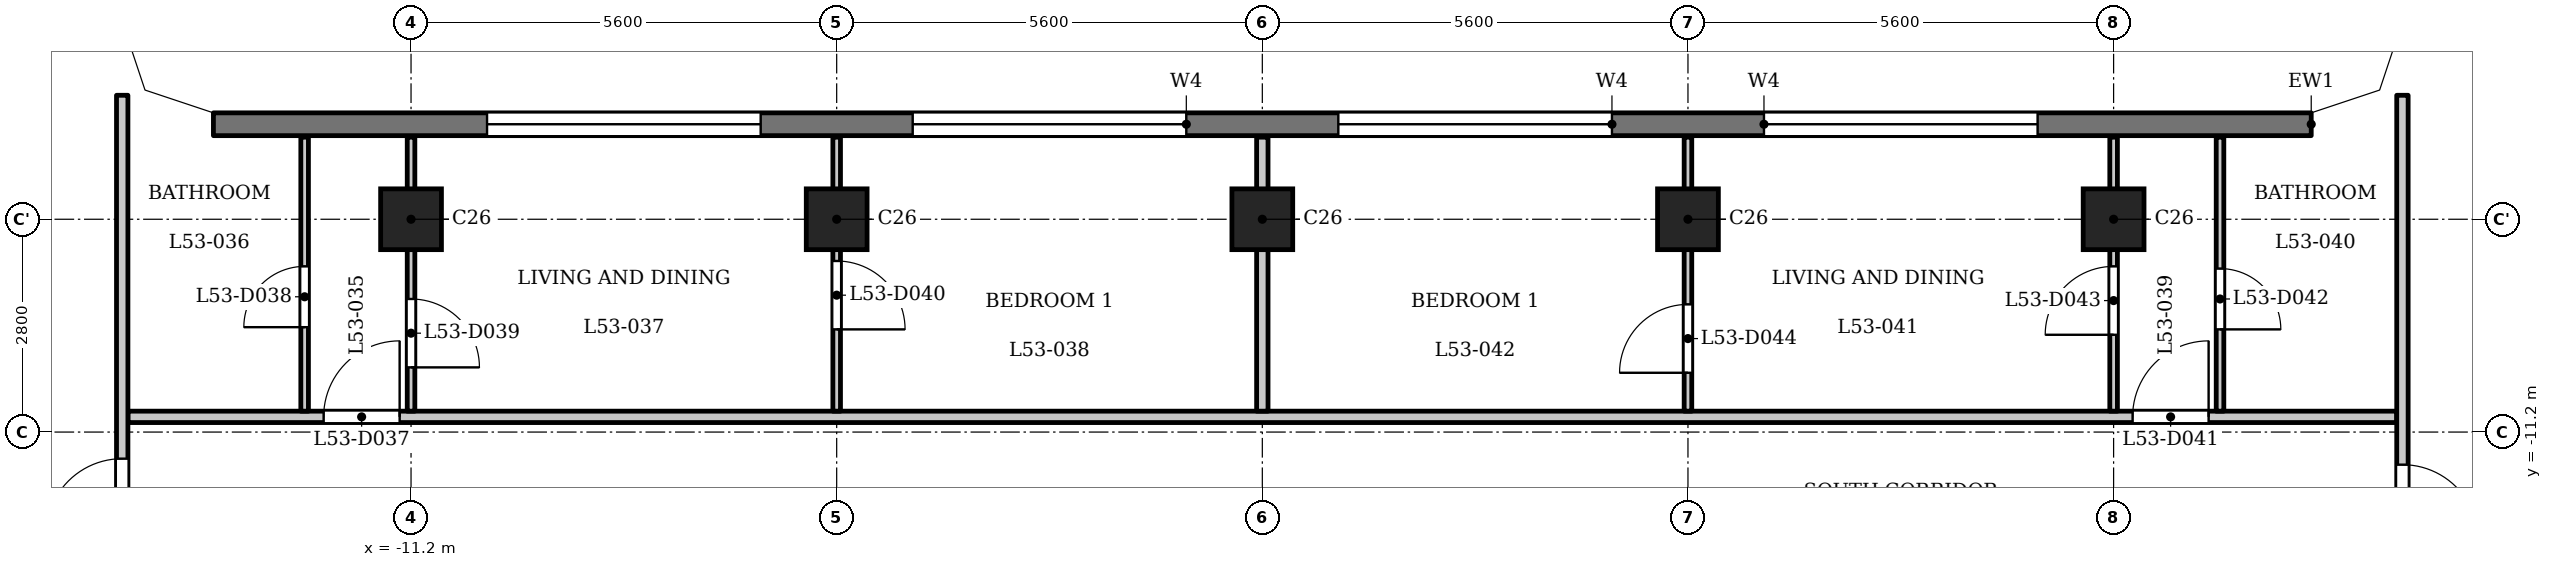
"""IFC4 building model, lengths in metres.
Left out: names, types, materials, properties, quantities, classifications, styles, units other than length and angle.
Written with IfcOpenShell. Run it as: python <this file> out.ifc"""

import sys

from ifc_helpers import new_model, si_unit, direction, frame, frame_2d, origin, origin_2d, place, context, subcontext, project, spatial, polyline, rectangle, outline, extrude, element, fill, save


model = new_model("IFC4")
c1 = context("Model", 3, precision=1e-05, world=origin(), true_north=direction((0.0, 1.0)))
c2 = subcontext(c1, "Body", "Model", "MODEL_VIEW")
j1 = project(units=[si_unit("LENGTHUNIT", "METRE"), si_unit("PLANEANGLEUNIT", "RADIAN")], contexts=[c1])
p1 = place(None, origin())
s1 = spatial("IfcSite", under=j1, at=p1, CompositionType="ELEMENT")
p2 = place(p1, origin())
s2 = spatial("IfcBuilding", under=s1, at=p2, CompositionType="ELEMENT")
p3 = place(p2, frame((0.0, 0.0, 206.4)))
s3 = spatial("IfcBuildingStorey", under=s2, at=p3, CompositionType="ELEMENT", Elevation=206.4)
for number, where, z_axis, x_axis in (
    (1, (-11.2, -8.4, 0.0), (0.0, 0.0, 1.0), (1.0, 0.0, 0.0)),
    (2, (-5.6, -8.4, 0.0), (0.0, 0.0, 1.0), (1.0, 0.0, 0.0)),
    (3, (0.0, -8.4, 0.0), (0.0, 0.0, 1.0), (1.0, 0.0, 0.0)),
    (4, (5.6, -8.4, 0.0), (0.0, 0.0, 1.0), (1.0, 0.0, 0.0)),
    (5, (11.2, -8.4, 0.0), (0.0, 0.0, 1.0), (1.0, 0.0, 0.0)),
):
    element("IfcColumn", number, at=place(p3, frame(where, z_axis=z_axis, x_axis=x_axis)), inside=s3, PredefinedType="COLUMN", context=c2, shape_type="SweptSolid", body=[
        extrude(rectangle(XDim=0.8, YDim=0.8, at=origin_2d()), origin(), (0.0, 0.0, 1.0), 3.5),
    ])
p4 = place(p3, frame((13.8, -7.15, 0.0), z_axis=(0.0, 0.0, 1.0), x_axis=(-1.0, 0.0, 0.0)))
e6 = element("IfcWall", 6, at=p4, inside=s3, PredefinedType="SOLIDWALL", context=c2, shape_type="SweptSolid", body=[
    extrude(rectangle(XDim=27.6, YDim=0.3, at=frame_2d((13.8, 0.0))), origin(), (0.0, 0.0, 1.0), 3.2),
])
p5 = place(p4, frame((3.6, 0.0, 1.2)))
e7 = element("IfcOpeningElement", 7, at=p5, cuts=e6, PredefinedType="OPENING", context=c2, shape_type="SweptSolid", body=[
    extrude(rectangle(XDim=3.6, YDim=0.95, at=frame_2d((1.8, 0.475))), frame((0.0, 0.16, 0.0), z_axis=(0.0, -1.0, 0.0), x_axis=(1.0, 0.0, 0.0)), (0.0, 0.0, 1.0), 0.32),
])
p6 = place(p4, frame((9.2, 0.0, 1.2)))
e8 = element("IfcOpeningElement", 8, at=p6, cuts=e6, PredefinedType="OPENING", context=c2, shape_type="SweptSolid", body=[
    extrude(rectangle(XDim=3.6, YDim=0.95, at=frame_2d((1.8, 0.475))), frame((0.0, 0.16, 0.0), z_axis=(0.0, -1.0, 0.0), x_axis=(1.0, 0.0, 0.0)), (0.0, 0.0, 1.0), 0.32),
])
p7 = place(p4, frame((14.8, 0.0, 1.2)))
e9 = element("IfcOpeningElement", 9, at=p7, cuts=e6, PredefinedType="OPENING", context=c2, shape_type="SweptSolid", body=[
    extrude(rectangle(XDim=3.6, YDim=0.95, at=frame_2d((1.8, 0.475))), frame((0.0, 0.16, 0.0), z_axis=(0.0, -1.0, 0.0), x_axis=(1.0, 0.0, 0.0)), (0.0, 0.0, 1.0), 0.32),
])
p8 = place(p4, frame((20.4, 0.0, 1.2)))
e10 = element("IfcOpeningElement", 10, at=p8, cuts=e6, PredefinedType="OPENING", context=c2, shape_type="SweptSolid", body=[
    extrude(rectangle(XDim=3.6, YDim=0.95, at=frame_2d((1.8, 0.475))), frame((0.0, 0.16, 0.0), z_axis=(0.0, -1.0, 0.0), x_axis=(1.0, 0.0, 0.0)), (0.0, 0.0, 1.0), 0.32),
])
p9 = place(p3, frame((-14.925, -11.0, 0.0), z_axis=(0.0, 0.0, 1.0), x_axis=(1.0, 0.0, 0.0)))
e11 = element("IfcWall", 11, at=p9, inside=s3, PredefinedType="PARTITIONING", context=c2, shape_type="SweptSolid", body=[
    extrude(rectangle(XDim=29.85, YDim=0.15, at=frame_2d((14.925, 0.0))), origin(), (0.0, 0.0, 1.0), 3.2),
])
p10 = place(p9, frame((2.575, 0.0, 0.0)))
e12 = element("IfcOpeningElement", 12, at=p10, cuts=e11, PredefinedType="OPENING", context=c2, shape_type="SweptSolid", body=[
    extrude(rectangle(XDim=1.0, YDim=2.1, at=frame_2d((0.5, 1.05))), frame((0.0, 0.085, 0.0), z_axis=(0.0, -1.0, 0.0), x_axis=(1.0, 0.0, 0.0)), (0.0, 0.0, 1.0), 0.17),
])
p11 = place(p9, frame((26.375, 0.0, 0.0)))
e13 = element("IfcOpeningElement", 13, at=p11, cuts=e11, PredefinedType="OPENING", context=c2, shape_type="SweptSolid", body=[
    extrude(rectangle(XDim=1.0, YDim=2.1, at=frame_2d((0.5, 1.05))), frame((0.0, 0.085, 0.0), z_axis=(0.0, -1.0, 0.0), x_axis=(1.0, 0.0, 0.0)), (0.0, 0.0, 1.0), 0.17),
])
p12 = place(p3, frame((-15.0, -13.125, 0.0), z_axis=(0.0, 0.0, 1.0), x_axis=(0.0, 1.0, 0.0)))
e14 = element("IfcWall", 14, at=p12, inside=s3, PredefinedType="PARTITIONING", context=c2, shape_type="SweptSolid", body=[
    extrude(rectangle(XDim=6.356, YDim=0.15, at=frame_2d((3.178, 0.0))), origin(), (0.0, 0.0, 1.0), 3.2),
])
p13 = place(p12, frame((0.575, 0.0, 0.0)))
e15 = element("IfcOpeningElement", 15, at=p13, cuts=e14, PredefinedType="OPENING", context=c2, shape_type="SweptSolid", body=[
    extrude(rectangle(XDim=1.0, YDim=2.1, at=frame_2d((0.5, 1.05))), frame((0.0, 0.085, 0.0), z_axis=(0.0, -1.0, 0.0), x_axis=(1.0, 0.0, 0.0)), (0.0, 0.0, 1.0), 0.17),
])
p14 = place(p3, frame((-12.6, -10.925, 0.0), z_axis=(0.0, 0.0, 1.0), x_axis=(0.0, 1.0, 0.0)))
e16 = element("IfcWall", 16, at=p14, inside=s3, PredefinedType="PARTITIONING", context=c2, shape_type="SweptSolid", body=[
    extrude(rectangle(XDim=3.605, YDim=0.1, at=frame_2d((1.802, 0.0))), origin(), (0.0, 0.0, 1.0), 3.2),
])
p15 = place(p14, frame((1.105, 0.0, 0.0)))
e17 = element("IfcOpeningElement", 17, at=p15, cuts=e16, PredefinedType="OPENING", context=c2, shape_type="SweptSolid", body=[
    extrude(rectangle(XDim=0.8, YDim=2.1, at=frame_2d((0.4, 1.05))), frame((0.0, 0.06, 0.0), z_axis=(0.0, -1.0, 0.0), x_axis=(1.0, 0.0, 0.0)), (0.0, 0.0, 1.0), 0.12),
])
p16 = place(p3, frame((-11.2, -10.925, 0.0), z_axis=(0.0, 0.0, 1.0), x_axis=(0.0, 1.0, 0.0)))
e18 = element("IfcWall", 18, at=p16, inside=s3, PredefinedType="PARTITIONING", context=c2, shape_type="SweptSolid", body=[
    extrude(rectangle(XDim=3.605, YDim=0.1, at=frame_2d((1.802, 0.0))), origin(), (0.0, 0.0, 1.0), 3.2),
])
p17 = place(p16, frame((0.576, 0.0, 0.0)))
e19 = element("IfcOpeningElement", 19, at=p17, cuts=e18, PredefinedType="OPENING", context=c2, shape_type="SweptSolid", body=[
    extrude(rectangle(XDim=0.9, YDim=2.1, at=frame_2d((0.45, 1.05))), frame((0.0, 0.06, 0.0), z_axis=(0.0, -1.0, 0.0), x_axis=(1.0, 0.0, 0.0)), (0.0, 0.0, 1.0), 0.12),
])
p18 = place(p3, frame((-5.6, -10.925, 0.0), z_axis=(0.0, 0.0, 1.0), x_axis=(0.0, 1.0, 0.0)))
e20 = element("IfcWall", 20, at=p18, inside=s3, PredefinedType="PARTITIONING", context=c2, shape_type="SweptSolid", body=[
    extrude(rectangle(XDim=3.605, YDim=0.1, at=frame_2d((1.802, 0.0))), origin(), (0.0, 0.0, 1.0), 3.2),
])
p19 = place(p18, frame((1.076, 0.0, 0.0)))
e21 = element("IfcOpeningElement", 21, at=p19, cuts=e20, PredefinedType="OPENING", context=c2, shape_type="SweptSolid", body=[
    extrude(rectangle(XDim=0.9, YDim=2.1, at=frame_2d((0.45, 1.05))), frame((0.0, 0.06, 0.0), z_axis=(0.0, -1.0, 0.0), x_axis=(1.0, 0.0, 0.0)), (0.0, 0.0, 1.0), 0.12),
])
p20 = place(p3, frame((0.0, -10.925, 0.0), z_axis=(0.0, 0.0, 1.0), x_axis=(0.0, 1.0, 0.0)))
e22 = element("IfcWall", 22, at=p20, inside=s3, PredefinedType="PARTITIONING", context=c2, shape_type="SweptSolid", body=[
    extrude(rectangle(XDim=3.605, YDim=0.15, at=frame_2d((1.802, 0.0))), origin(), (0.0, 0.0, 1.0), 3.2),
])
p21 = place(p3, frame((5.6, -10.925, 0.0), z_axis=(0.0, 0.0, 1.0), x_axis=(0.0, 1.0, 0.0)))
e23 = element("IfcWall", 23, at=p21, inside=s3, PredefinedType="PARTITIONING", context=c2, shape_type="SweptSolid", body=[
    extrude(rectangle(XDim=3.605, YDim=0.1, at=frame_2d((1.802, 0.0))), origin(), (0.0, 0.0, 1.0), 3.2),
])
p22 = place(p21, frame((0.505, 0.0, 0.0)))
e24 = element("IfcOpeningElement", 24, at=p22, cuts=e23, PredefinedType="OPENING", context=c2, shape_type="SweptSolid", body=[
    extrude(rectangle(XDim=0.9, YDim=2.1, at=frame_2d((0.45, 1.05))), frame((0.0, 0.06, 0.0), z_axis=(0.0, -1.0, 0.0), x_axis=(1.0, 0.0, 0.0)), (0.0, 0.0, 1.0), 0.12),
])
p23 = place(p3, frame((11.2, -10.925, 0.0), z_axis=(0.0, 0.0, 1.0), x_axis=(0.0, 1.0, 0.0)))
e25 = element("IfcWall", 25, at=p23, inside=s3, PredefinedType="PARTITIONING", context=c2, shape_type="SweptSolid", body=[
    extrude(rectangle(XDim=3.605, YDim=0.1, at=frame_2d((1.802, 0.0))), origin(), (0.0, 0.0, 1.0), 3.2),
])
p24 = place(p23, frame((1.005, 0.0, 0.0)))
e26 = element("IfcOpeningElement", 26, at=p24, cuts=e25, PredefinedType="OPENING", context=c2, shape_type="SweptSolid", body=[
    extrude(rectangle(XDim=0.9, YDim=2.1, at=frame_2d((0.45, 1.05))), frame((0.0, 0.06, 0.0), z_axis=(0.0, -1.0, 0.0), x_axis=(1.0, 0.0, 0.0)), (0.0, 0.0, 1.0), 0.12),
])
p25 = place(p3, frame((12.6, -10.925, 0.0), z_axis=(0.0, 0.0, 1.0), x_axis=(0.0, 1.0, 0.0)))
e27 = element("IfcWall", 27, at=p25, inside=s3, PredefinedType="PARTITIONING", context=c2, shape_type="SweptSolid", body=[
    extrude(rectangle(XDim=3.605, YDim=0.1, at=frame_2d((1.802, 0.0))), origin(), (0.0, 0.0, 1.0), 3.2),
])
p26 = place(p25, frame((1.076, 0.0, 0.0)))
e28 = element("IfcOpeningElement", 28, at=p26, cuts=e27, PredefinedType="OPENING", context=c2, shape_type="SweptSolid", body=[
    extrude(rectangle(XDim=0.8, YDim=2.1, at=frame_2d((0.4, 1.05))), frame((0.0, 0.06, 0.0), z_axis=(0.0, -1.0, 0.0), x_axis=(1.0, 0.0, 0.0)), (0.0, 0.0, 1.0), 0.12),
])
p27 = place(p3, frame((15.0, -13.125, 0.0), z_axis=(0.0, 0.0, 1.0), x_axis=(0.0, 1.0, 0.0)))
e29 = element("IfcWall", 29, at=p27, inside=s3, PredefinedType="PARTITIONING", context=c2, shape_type="SweptSolid", body=[
    extrude(rectangle(XDim=6.356, YDim=0.15, at=frame_2d((3.178, 0.0))), origin(), (0.0, 0.0, 1.0), 3.2),
])
p28 = place(p27, frame((0.496, 0.0, 0.0)))
e30 = element("IfcOpeningElement", 30, at=p28, cuts=e29, PredefinedType="OPENING", context=c2, shape_type="SweptSolid", body=[
    extrude(rectangle(XDim=1.0, YDim=2.1, at=frame_2d((0.5, 1.05))), frame((0.0, 0.085, 0.0), z_axis=(0.0, -1.0, 0.0), x_axis=(1.0, 0.0, 0.0)), (0.0, 0.0, 1.0), 0.17),
])
p29 = place(p3, origin())
e31 = element("IfcWall", 31, at=p29, inside=s3, PredefinedType="SOLIDWALL", context=c2, shape_type="SweptSolid", body=[
    extrude(outline(polyline([(14.937, -6.937), (15.3, -5.849), (15.3, -5.8), (15.0, -5.8), (14.7, -6.7), (13.8, -7.0), (13.8, -7.3), (13.849, -7.3), (14.937, -6.937)])), origin(), (0.0, 0.0, 1.0), 3.2),
])
e32 = element("IfcWall", 32, at=p29, inside=s3, PredefinedType="SOLIDWALL", context=c2, shape_type="SweptSolid", body=[
    extrude(outline(polyline([(-14.937, -6.937), (-13.849, -7.3), (-13.8, -7.3), (-13.8, -7.0), (-14.7, -6.7), (-15.0, -5.8), (-15.3, -5.8), (-15.3, -5.849), (-14.937, -6.937)])), origin(), (0.0, 0.0, 1.0), 3.2),
])
p30 = place(p13, origin())
e33 = element("IfcDoor", 33, at=p30, inside=s3, OperationType="SINGLE_SWING_RIGHT", PredefinedType="DOOR", context=c2, shape_type="SweptSolid", body=[
    extrude(rectangle(XDim=1.0, YDim=2.1, at=frame_2d((0.5, 1.05))), frame((0.0, 0.025, 0.0), z_axis=(0.0, -1.0, 0.0), x_axis=(1.0, 0.0, 0.0)), (0.0, 0.0, 1.0), 0.05),
])
fill(e15, e33)
p31 = place(p28, origin())
e34 = element("IfcDoor", 34, at=p31, inside=s3, OperationType="SINGLE_SWING_LEFT", PredefinedType="DOOR", context=c2, shape_type="SweptSolid", body=[
    extrude(rectangle(XDim=1.0, YDim=2.1, at=frame_2d((0.5, 1.05))), frame((0.0, 0.025, 0.0), z_axis=(0.0, -1.0, 0.0), x_axis=(1.0, 0.0, 0.0)), (0.0, 0.0, 1.0), 0.05),
])
fill(e30, e34)
p32 = place(p10, origin())
e35 = element("IfcDoor", 35, at=p32, inside=s3, OperationType="SINGLE_SWING_LEFT", PredefinedType="DOOR", context=c2, shape_type="SweptSolid", body=[
    extrude(rectangle(XDim=1.0, YDim=2.1, at=frame_2d((0.5, 1.05))), frame((0.0, 0.025, 0.0), z_axis=(0.0, -1.0, 0.0), x_axis=(1.0, 0.0, 0.0)), (0.0, 0.0, 1.0), 0.05),
])
fill(e12, e35)
p33 = place(p15, origin())
e36 = element("IfcDoor", 36, at=p33, inside=s3, OperationType="SINGLE_SWING_RIGHT", PredefinedType="DOOR", context=c2, shape_type="SweptSolid", body=[
    extrude(rectangle(XDim=0.8, YDim=2.1, at=frame_2d((0.4, 1.05))), frame((0.0, 0.025, 0.0), z_axis=(0.0, -1.0, 0.0), x_axis=(1.0, 0.0, 0.0)), (0.0, 0.0, 1.0), 0.05),
])
fill(e17, e36)
p34 = place(p17, origin())
e37 = element("IfcDoor", 37, at=p34, inside=s3, OperationType="SINGLE_SWING_LEFT", PredefinedType="DOOR", context=c2, shape_type="SweptSolid", body=[
    extrude(rectangle(XDim=0.9, YDim=2.1, at=frame_2d((0.45, 1.05))), frame((0.0, 0.025, 0.0), z_axis=(0.0, -1.0, 0.0), x_axis=(1.0, 0.0, 0.0)), (0.0, 0.0, 1.0), 0.05),
])
fill(e19, e37)
p35 = place(p19, origin())
e38 = element("IfcDoor", 38, at=p35, inside=s3, OperationType="SINGLE_SWING_LEFT", PredefinedType="DOOR", context=c2, shape_type="SweptSolid", body=[
    extrude(rectangle(XDim=0.9, YDim=2.1, at=frame_2d((0.45, 1.05))), frame((0.0, 0.025, 0.0), z_axis=(0.0, -1.0, 0.0), x_axis=(1.0, 0.0, 0.0)), (0.0, 0.0, 1.0), 0.05),
])
fill(e21, e38)
p36 = place(p11, origin())
e39 = element("IfcDoor", 39, at=p36, inside=s3, OperationType="SINGLE_SWING_LEFT", PredefinedType="DOOR", context=c2, shape_type="SweptSolid", body=[
    extrude(rectangle(XDim=1.0, YDim=2.1, at=frame_2d((0.5, 1.05))), frame((0.0, 0.025, 0.0), z_axis=(0.0, -1.0, 0.0), x_axis=(1.0, 0.0, 0.0)), (0.0, 0.0, 1.0), 0.05),
])
fill(e13, e39)
p37 = place(p26, origin())
e40 = element("IfcDoor", 40, at=p37, inside=s3, OperationType="SINGLE_SWING_LEFT", PredefinedType="DOOR", context=c2, shape_type="SweptSolid", body=[
    extrude(rectangle(XDim=0.8, YDim=2.1, at=frame_2d((0.4, 1.05))), frame((0.0, 0.025, 0.0), z_axis=(0.0, -1.0, 0.0), x_axis=(1.0, 0.0, 0.0)), (0.0, 0.0, 1.0), 0.05),
])
fill(e28, e40)
p38 = place(p24, origin())
e41 = element("IfcDoor", 41, at=p38, inside=s3, OperationType="SINGLE_SWING_RIGHT", PredefinedType="DOOR", context=c2, shape_type="SweptSolid", body=[
    extrude(rectangle(XDim=0.9, YDim=2.1, at=frame_2d((0.45, 1.05))), frame((0.0, 0.025, 0.0), z_axis=(0.0, -1.0, 0.0), x_axis=(1.0, 0.0, 0.0)), (0.0, 0.0, 1.0), 0.05),
])
fill(e26, e41)
p39 = place(p22, origin())
e42 = element("IfcDoor", 42, at=p39, inside=s3, OperationType="SINGLE_SWING_RIGHT", PredefinedType="DOOR", context=c2, shape_type="SweptSolid", body=[
    extrude(rectangle(XDim=0.9, YDim=2.1, at=frame_2d((0.45, 1.05))), frame((0.0, 0.025, 0.0), z_axis=(0.0, -1.0, 0.0), x_axis=(1.0, 0.0, 0.0)), (0.0, 0.0, 1.0), 0.05),
])
fill(e24, e42)
p40 = place(p5, origin())
e43 = element("IfcWindow", 43, at=p40, inside=s3, PartitioningType="SINGLE_PANEL", PredefinedType="WINDOW", context=c2, shape_type="SweptSolid", body=[
    extrude(rectangle(XDim=3.6, YDim=0.95, at=frame_2d((1.8, 0.475))), frame((0.0, 0.03, 0.0), z_axis=(0.0, -1.0, 0.0), x_axis=(1.0, 0.0, 0.0)), (0.0, 0.0, 1.0), 0.06),
])
fill(e7, e43)
p41 = place(p6, origin())
e44 = element("IfcWindow", 44, at=p41, inside=s3, PartitioningType="SINGLE_PANEL", PredefinedType="WINDOW", context=c2, shape_type="SweptSolid", body=[
    extrude(rectangle(XDim=3.6, YDim=0.95, at=frame_2d((1.8, 0.475))), frame((0.0, 0.03, 0.0), z_axis=(0.0, -1.0, 0.0), x_axis=(1.0, 0.0, 0.0)), (0.0, 0.0, 1.0), 0.06),
])
fill(e8, e44)
p42 = place(p7, origin())
e45 = element("IfcWindow", 45, at=p42, inside=s3, PartitioningType="SINGLE_PANEL", PredefinedType="WINDOW", context=c2, shape_type="SweptSolid", body=[
    extrude(rectangle(XDim=3.6, YDim=0.95, at=frame_2d((1.8, 0.475))), frame((0.0, 0.03, 0.0), z_axis=(0.0, -1.0, 0.0), x_axis=(1.0, 0.0, 0.0)), (0.0, 0.0, 1.0), 0.06),
])
fill(e9, e45)
p43 = place(p8, origin())
e46 = element("IfcWindow", 46, at=p43, inside=s3, PartitioningType="SINGLE_PANEL", PredefinedType="WINDOW", context=c2, shape_type="SweptSolid", body=[
    extrude(rectangle(XDim=3.6, YDim=0.95, at=frame_2d((1.8, 0.475))), frame((0.0, 0.03, 0.0), z_axis=(0.0, -1.0, 0.0), x_axis=(1.0, 0.0, 0.0)), (0.0, 0.0, 1.0), 0.06),
])
fill(e10, e46)
save(model, sys.argv[1])
